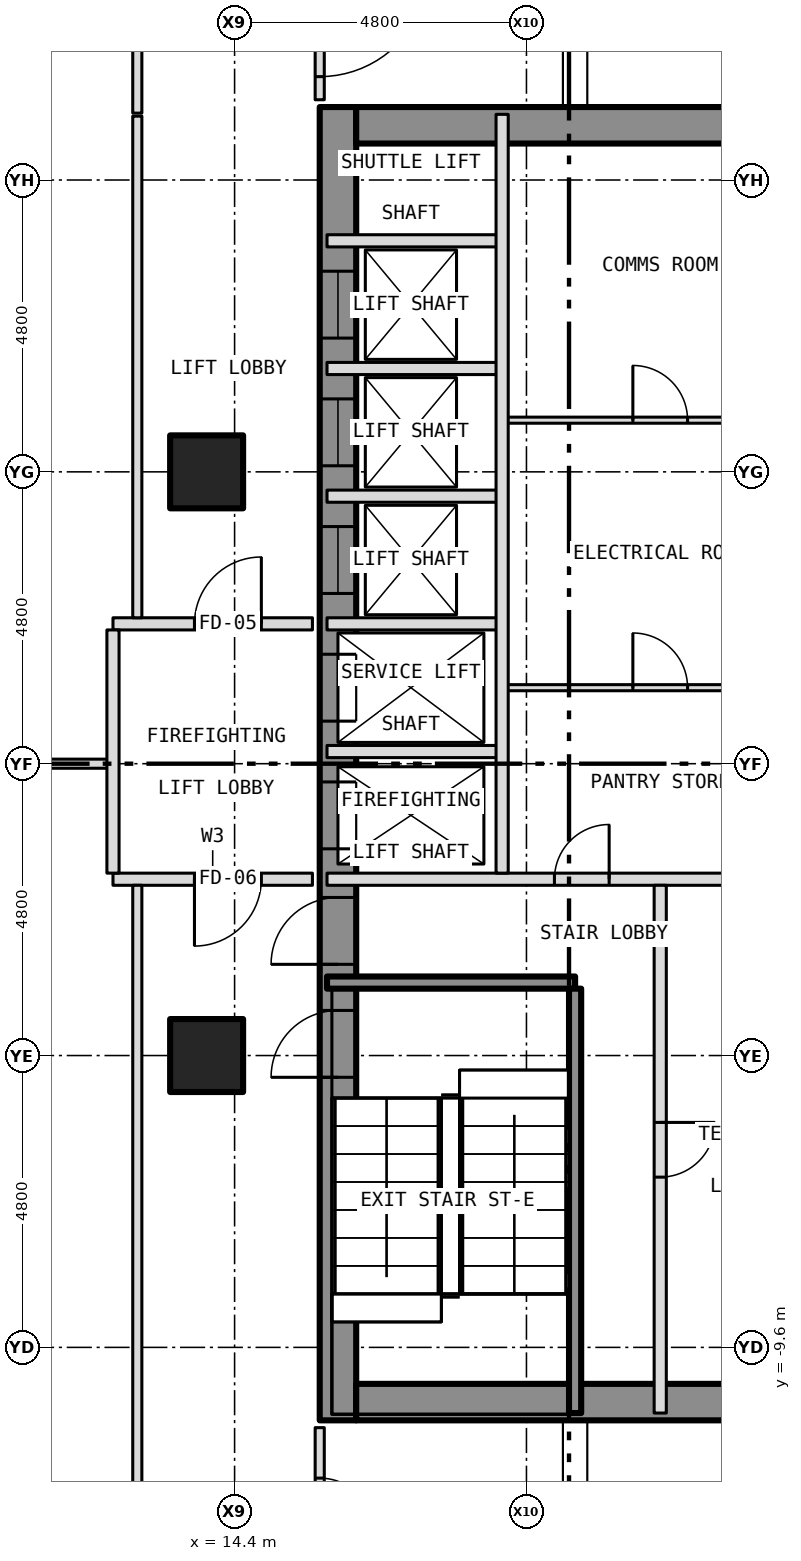
"""IFC4 building model, lengths in metres.
Left out: names, types, materials, properties, quantities, classifications, styles, units other than length and angle.
Written with IfcOpenShell. Run it as: python <this file> out.ifc"""

import sys

from ifc_helpers import new_model, si_unit, direction, frame, frame_2d, origin, origin_2d, place, context, subcontext, project, spatial, rectangle, hollow_rectangle, extrude, element, fill, save


model = new_model("IFC4")
c1 = context("Model", 3, precision=1e-05, world=origin(), true_north=direction((0.0, 1.0)))
c2 = subcontext(c1, "Body", "Model", "MODEL_VIEW")
j1 = project(units=[si_unit("LENGTHUNIT", "METRE"), si_unit("PLANEANGLEUNIT", "RADIAN")], contexts=[c1])
p1 = place(None, origin())
s1 = spatial("IfcSite", under=j1, at=p1, CompositionType="ELEMENT")
p2 = place(p1, origin())
s2 = spatial("IfcBuilding", under=s1, at=p2, CompositionType="ELEMENT")
p3 = place(p2, frame((0.0, 0.0, 33.5)))
s3 = spatial("IfcBuildingStorey", under=s2, at=p3, CompositionType="ELEMENT", Elevation=33.5)
for number, where, z_axis, x_axis in (
    (1, (13.94, -4.8, -0.3), (0.0, 0.0, 1.0), (1.0, 0.0, 0.0)),
    (2, (13.94, 4.8, -0.3), (0.0, 0.0, 1.0), (1.0, 0.0, 0.0)),
):
    element("IfcColumn", number, at=place(p3, frame(where, z_axis=z_axis, x_axis=x_axis)), inside=s3, PredefinedType="COLUMN", context=c2, shape_type="SweptSolid", body=[
        extrude(hollow_rectangle(XDim=1.2, YDim=1.2, WallThickness=0.07, at=origin_2d()), origin(), (0.0, 0.0, 1.0), 5.65),
    ])
p4 = place(p3, frame((16.1, -10.8, 0.0), z_axis=(0.0, 0.0, 1.0), x_axis=(0.0, 1.0, 0.0)))
e3 = element("IfcWall", 3, at=p4, inside=s3, PredefinedType="SHEAR", context=c2, shape_type="SweptSolid", body=[
    extrude(rectangle(XDim=21.6, YDim=0.6, at=frame_2d((10.8, 0.0))), origin(), (0.0, 0.0, 1.0), 4.9),
])
p5 = place(p4, frame((9.4, 0.0, 0.0)))
e4 = element("IfcOpeningElement", 4, at=p5, cuts=e3, PredefinedType="OPENING", context=c2, shape_type="SweptSolid", body=[
    extrude(rectangle(XDim=1.1, YDim=2.1, at=frame_2d((0.55, 1.05))), frame((0.0, 0.312, 0.0), z_axis=(0.0, -1.0, 0.0), x_axis=(1.0, 0.0, 0.0)), (0.0, 0.0, 1.0), 0.624),
])
p6 = place(p4, frame((11.5, 0.0, 0.0)))
e5 = element("IfcOpeningElement", 5, at=p6, cuts=e3, PredefinedType="OPENING", context=c2, shape_type="SweptSolid", body=[
    extrude(rectangle(XDim=1.1, YDim=2.1, at=frame_2d((0.55, 1.05))), frame((0.0, 0.312, 0.0), z_axis=(0.0, -1.0, 0.0), x_axis=(1.0, 0.0, 0.0)), (0.0, 0.0, 1.0), 0.624),
])
p7 = place(p4, frame((13.6, 0.0, 0.0)))
e6 = element("IfcOpeningElement", 6, at=p7, cuts=e3, PredefinedType="OPENING", context=c2, shape_type="SweptSolid", body=[
    extrude(rectangle(XDim=1.1, YDim=2.1, at=frame_2d((0.55, 1.05))), frame((0.0, 0.312, 0.0), z_axis=(0.0, -1.0, 0.0), x_axis=(1.0, 0.0, 0.0)), (0.0, 0.0, 1.0), 0.624),
])
p8 = place(p4, frame((15.7, 0.0, 0.0)))
e7 = element("IfcOpeningElement", 7, at=p8, cuts=e3, PredefinedType="OPENING", context=c2, shape_type="SweptSolid", body=[
    extrude(rectangle(XDim=1.1, YDim=2.1, at=frame_2d((0.55, 1.05))), frame((0.0, 0.312, 0.0), z_axis=(0.0, -1.0, 0.0), x_axis=(1.0, 0.0, 0.0)), (0.0, 0.0, 1.0), 0.624),
])
p9 = place(p4, frame((17.8, 0.0, 0.0)))
e8 = element("IfcOpeningElement", 8, at=p9, cuts=e3, PredefinedType="OPENING", context=c2, shape_type="SweptSolid", body=[
    extrude(rectangle(XDim=1.1, YDim=2.1, at=frame_2d((0.55, 1.05))), frame((0.0, 0.312, 0.0), z_axis=(0.0, -1.0, 0.0), x_axis=(1.0, 0.0, 0.0)), (0.0, 0.0, 1.0), 0.624),
])
p10 = place(p4, frame((5.642, 0.0, 0.0)))
e9 = element("IfcOpeningElement", 9, at=p10, cuts=e3, PredefinedType="OPENING", context=c2, shape_type="SweptSolid", body=[
    extrude(rectangle(XDim=1.1, YDim=2.1, at=frame_2d((0.55, 1.05))), frame((0.0, 0.312, 0.0), z_axis=(0.0, -1.0, 0.0), x_axis=(1.0, 0.0, 0.0)), (0.0, 0.0, 1.0), 0.624),
])
p11 = place(p4, frame((7.5, 0.0, 0.0)))
e10 = element("IfcOpeningElement", 10, at=p11, cuts=e3, PredefinedType="OPENING", context=c2, shape_type="SweptSolid", body=[
    extrude(rectangle(XDim=1.1, YDim=2.1, at=frame_2d((0.55, 1.05))), frame((0.0, 0.312, 0.0), z_axis=(0.0, -1.0, 0.0), x_axis=(1.0, 0.0, 0.0)), (0.0, 0.0, 1.0), 0.624),
])
for number, where, z_axis, x_axis in (
    (11, (16.4, 10.5, 0.0), (0.0, 0.0, 1.0), (1.0, 0.0, 0.0)),
    (12, (16.4, -10.5, 0.0), (0.0, 0.0, 1.0), (1.0, 0.0, 0.0)),
):
    element("IfcWall", number, at=place(p3, frame(where, z_axis=z_axis, x_axis=x_axis)), inside=s3, PredefinedType="SHEAR", context=c2, shape_type="SweptSolid", body=[
        extrude(rectangle(XDim=7.0, YDim=0.6, at=frame_2d((3.5, 0.0))), origin(), (0.0, 0.0, 1.0), 4.9),
    ])
p12 = place(p3, frame((15.92, -3.6, 0.0), z_axis=(0.0, 0.0, 1.0), x_axis=(1.0, 0.0, 0.0)))
e13 = element("IfcWall", 13, at=p12, inside=s3, PredefinedType="SHEAR", context=c2, shape_type="SweptSolid", body=[
    extrude(rectangle(XDim=4.08, YDim=0.2, at=frame_2d((2.04, 0.0))), origin(), (0.0, 0.0, 1.0), 4.9),
])
p13 = place(p3, frame((12.4, -1.9, 0.0), z_axis=(0.0, 0.0, 1.0), x_axis=(1.0, 0.0, 0.0)))
e14 = element("IfcWall", 14, at=p13, inside=s3, PredefinedType="PARTITIONING", context=c2, shape_type="SweptSolid", body=[
    extrude(rectangle(XDim=3.28, YDim=0.2, at=frame_2d((1.64, 0.0))), origin(), (0.0, 0.0, 1.0), 5.35),
])
p14 = place(p13, frame((1.34, 0.0, 0.0)))
e15 = element("IfcOpeningElement", 15, at=p14, cuts=e14, PredefinedType="OPENING", context=c2, shape_type="SweptSolid", body=[
    extrude(rectangle(XDim=1.1, YDim=2.1, at=frame_2d((0.55, 1.05))), frame((0.0, 0.112, 0.0), z_axis=(0.0, -1.0, 0.0), x_axis=(1.0, 0.0, 0.0)), (0.0, 0.0, 1.0), 0.224),
])
p15 = place(p3, frame((15.92, -1.9, 0.0), z_axis=(0.0, 0.0, 1.0), x_axis=(1.0, 0.0, 0.0)))
e16 = element("IfcWall", 16, at=p15, inside=s3, PredefinedType="PARTITIONING", context=c2, shape_type="SweptSolid", body=[
    extrude(rectangle(XDim=7.96, YDim=0.2, at=frame_2d((3.98, 0.0))), origin(), (0.0, 0.0, 1.0), 4.9),
])
p16 = place(p15, frame((3.74, 0.0, 0.0)))
e17 = element("IfcOpeningElement", 17, at=p16, cuts=e16, PredefinedType="OPENING", context=c2, shape_type="SweptSolid", body=[
    extrude(rectangle(XDim=0.9, YDim=2.1, at=frame_2d((0.45, 1.05))), frame((0.0, 0.112, 0.0), z_axis=(0.0, -1.0, 0.0), x_axis=(1.0, 0.0, 0.0)), (0.0, 0.0, 1.0), 0.224),
])
p17 = place(p3, frame((4.954, 0.0, 0.0), z_axis=(0.0, 0.0, 1.0), x_axis=(1.0, 0.0, 0.0)))
e18 = element("IfcWall", 18, at=p17, inside=s3, PredefinedType="PARTITIONING", context=c2, shape_type="SweptSolid", body=[
    extrude(rectangle(XDim=7.446, YDim=0.15, at=frame_2d((3.723, 0.0))), origin(), (0.0, 0.0, 1.0), 4.359),
])
p18 = place(p3, frame((15.92, 0.2, 0.0), z_axis=(0.0, 0.0, 1.0), x_axis=(1.0, 0.0, 0.0)))
e19 = element("IfcWall", 19, at=p18, inside=s3, PredefinedType="PARTITIONING", context=c2, shape_type="SweptSolid", body=[
    extrude(rectangle(XDim=2.88, YDim=0.2, at=frame_2d((1.44, 0.0))), origin(), (0.0, 0.0, 1.0), 4.9),
])
p19 = place(p3, frame((18.8, 1.25, 0.0), z_axis=(0.0, 0.0, 1.0), x_axis=(1.0, 0.0, 0.0)))
e20 = element("IfcWall", 20, at=p19, inside=s3, PredefinedType="PARTITIONING", context=c2, shape_type="SweptSolid", body=[
    extrude(rectangle(XDim=5.08, YDim=0.1, at=frame_2d((2.54, 0.0))), origin(), (0.0, 0.0, 1.0), 4.9),
])
p20 = place(p19, frame((2.15, 0.0, 0.0)))
e21 = element("IfcOpeningElement", 21, at=p20, cuts=e20, PredefinedType="OPENING", context=c2, shape_type="SweptSolid", body=[
    extrude(rectangle(XDim=0.9, YDim=2.1, at=frame_2d((0.45, 1.05))), frame((0.0, 0.062, 0.0), z_axis=(0.0, -1.0, 0.0), x_axis=(1.0, 0.0, 0.0)), (0.0, 0.0, 1.0), 0.124),
])
p21 = place(p3, frame((12.4, 2.3, 0.0), z_axis=(0.0, 0.0, 1.0), x_axis=(1.0, 0.0, 0.0)))
e22 = element("IfcWall", 22, at=p21, inside=s3, PredefinedType="PARTITIONING", context=c2, shape_type="SweptSolid", body=[
    extrude(rectangle(XDim=3.28, YDim=0.2, at=frame_2d((1.64, 0.0))), origin(), (0.0, 0.0, 1.0), 5.35),
])
p22 = place(p21, frame((1.34, 0.0, 0.0)))
e23 = element("IfcOpeningElement", 23, at=p22, cuts=e22, PredefinedType="OPENING", context=c2, shape_type="SweptSolid", body=[
    extrude(rectangle(XDim=1.1, YDim=2.1, at=frame_2d((0.55, 1.05))), frame((0.0, 0.112, 0.0), z_axis=(0.0, -1.0, 0.0), x_axis=(1.0, 0.0, 0.0)), (0.0, 0.0, 1.0), 0.224),
])
for number, where, z_axis, x_axis in (
    (24, (15.92, 2.3, 0.0), (0.0, 0.0, 1.0), (1.0, 0.0, 0.0)),
    (25, (15.92, 4.4, 0.0), (0.0, 0.0, 1.0), (1.0, 0.0, 0.0)),
):
    element("IfcWall", number, at=place(p3, frame(where, z_axis=z_axis, x_axis=x_axis)), inside=s3, PredefinedType="PARTITIONING", context=c2, shape_type="SweptSolid", body=[
        extrude(rectangle(XDim=2.88, YDim=0.2, at=frame_2d((1.44, 0.0))), origin(), (0.0, 0.0, 1.0), 4.9),
    ])
p23 = place(p3, frame((18.8, 5.65, 0.0), z_axis=(0.0, 0.0, 1.0), x_axis=(1.0, 0.0, 0.0)))
e26 = element("IfcWall", 26, at=p23, inside=s3, PredefinedType="PARTITIONING", context=c2, shape_type="SweptSolid", body=[
    extrude(rectangle(XDim=5.08, YDim=0.1, at=frame_2d((2.54, 0.0))), origin(), (0.0, 0.0, 1.0), 4.9),
])
p24 = place(p23, frame((2.15, 0.0, 0.0)))
e27 = element("IfcOpeningElement", 27, at=p24, cuts=e26, PredefinedType="OPENING", context=c2, shape_type="SweptSolid", body=[
    extrude(rectangle(XDim=0.9, YDim=2.1, at=frame_2d((0.45, 1.05))), frame((0.0, 0.062, 0.0), z_axis=(0.0, -1.0, 0.0), x_axis=(1.0, 0.0, 0.0)), (0.0, 0.0, 1.0), 0.124),
])
for number, where, z_axis, x_axis in (
    (28, (15.92, 6.5, 0.0), (0.0, 0.0, 1.0), (1.0, 0.0, 0.0)),
    (29, (15.92, 8.6, 0.0), (0.0, 0.0, 1.0), (1.0, 0.0, 0.0)),
):
    element("IfcWall", number, at=place(p3, frame(where, z_axis=z_axis, x_axis=x_axis)), inside=s3, PredefinedType="PARTITIONING", context=c2, shape_type="SweptSolid", body=[
        extrude(rectangle(XDim=2.88, YDim=0.2, at=frame_2d((1.44, 0.0))), origin(), (0.0, 0.0, 1.0), 4.9),
    ])
p25 = place(p3, frame((12.4, -1.8, 0.0), z_axis=(0.0, 0.0, 1.0), x_axis=(0.0, 1.0, 0.0)))
e30 = element("IfcWall", 30, at=p25, inside=s3, PredefinedType="PARTITIONING", context=c2, shape_type="SweptSolid", body=[
    extrude(rectangle(XDim=4.0, YDim=0.2, at=frame_2d((2.0, 0.0))), origin(), (0.0, 0.0, 1.0), 5.35),
])
p26 = place(p3, frame((12.8, -13.525, 0.0), z_axis=(0.0, 0.0, 1.0), x_axis=(0.0, 1.0, 0.0)))
e31 = element("IfcWall", 31, at=p26, inside=s3, PredefinedType="PARTITIONING", context=c2, shape_type="SweptSolid", body=[
    extrude(rectangle(XDim=11.525, YDim=0.15, at=frame_2d((5.762, 0.0))), origin(), (0.0, 0.0, 1.0), 5.35),
])
p27 = place(p3, frame((12.8, 2.4, 0.0), z_axis=(0.0, 0.0, 1.0), x_axis=(0.0, 1.0, 0.0)))
e32 = element("IfcWall", 32, at=p27, inside=s3, PredefinedType="PARTITIONING", context=c2, shape_type="SweptSolid", body=[
    extrude(rectangle(XDim=8.25, YDim=0.15, at=frame_2d((4.125, 0.0))), origin(), (0.0, 0.0, 1.0), 5.35),
])
p28 = place(p3, frame((12.8, 10.7, 0.0), z_axis=(0.0, 0.0, 1.0), x_axis=(0.0, 1.0, 0.0)))
e33 = element("IfcWall", 33, at=p28, inside=s3, PredefinedType="PARTITIONING", context=c2, shape_type="SweptSolid", body=[
    extrude(rectangle(XDim=2.825, YDim=0.15, at=frame_2d((1.413, 0.0))), origin(), (0.0, 0.0, 1.0), 5.35),
])
p29 = place(p3, frame((15.8, -15.725, 0.0), z_axis=(0.0, 0.0, 1.0), x_axis=(0.0, 1.0, 0.0)))
e34 = element("IfcWall", 34, at=p29, inside=s3, PredefinedType="PARTITIONING", context=c2, shape_type="SweptSolid", body=[
    extrude(rectangle(XDim=4.805, YDim=0.15, at=frame_2d((2.403, 0.0))), origin(), (0.0, 0.0, 1.0), 5.35),
])
p30 = place(p29, frame((3.075, 0.0, 0.0)))
e35 = element("IfcOpeningElement", 35, at=p30, cuts=e34, PredefinedType="OPENING", context=c2, shape_type="SweptSolid", body=[
    extrude(rectangle(XDim=0.9, YDim=2.1, at=frame_2d((0.45, 1.05))), frame((0.0, 0.087, 0.0), z_axis=(0.0, -1.0, 0.0), x_axis=(1.0, 0.0, 0.0)), (0.0, 0.0, 1.0), 0.174),
])
p31 = place(p3, frame((15.8, 10.92, 0.0), z_axis=(0.0, 0.0, 1.0), x_axis=(0.0, 1.0, 0.0)))
e36 = element("IfcWall", 36, at=p31, inside=s3, PredefinedType="PARTITIONING", context=c2, shape_type="SweptSolid", body=[
    extrude(rectangle(XDim=4.805, YDim=0.15, at=frame_2d((2.403, 0.0))), origin(), (0.0, 0.0, 1.0), 5.35),
])
p32 = place(p31, frame((0.38, 0.0, 0.0)))
e37 = element("IfcOpeningElement", 37, at=p32, cuts=e36, PredefinedType="OPENING", context=c2, shape_type="SweptSolid", body=[
    extrude(rectangle(XDim=1.8, YDim=2.1, at=frame_2d((0.9, 1.05))), frame((0.0, 0.087, 0.0), z_axis=(0.0, -1.0, 0.0), x_axis=(1.0, 0.0, 0.0)), (0.0, 0.0, 1.0), 0.174),
])
p33 = place(p3, frame((18.8, -1.8, 0.0), z_axis=(0.0, 0.0, 1.0), x_axis=(0.0, 1.0, 0.0)))
e38 = element("IfcWall", 38, at=p33, inside=s3, PredefinedType="PARTITIONING", context=c2, shape_type="SweptSolid", body=[
    extrude(rectangle(XDim=12.48, YDim=0.2, at=frame_2d((6.24, 0.0))), origin(), (0.0, 0.0, 1.0), 4.9),
])
p34 = place(p3, frame((20.0, -10.68, 0.0), z_axis=(0.0, 0.0, 1.0), x_axis=(0.0, 1.0, 0.0)))
e39 = element("IfcWall", 39, at=p34, inside=s3, PredefinedType="SHEAR", context=c2, shape_type="SweptSolid", body=[
    extrude(rectangle(XDim=6.98, YDim=0.2, at=frame_2d((3.49, 0.0))), origin(), (0.0, 0.0, 1.0), 4.9),
])
p35 = place(p3, frame((21.4, -10.68, 0.0), z_axis=(0.0, 0.0, 1.0), x_axis=(0.0, 1.0, 0.0)))
e40 = element("IfcWall", 40, at=p35, inside=s3, PredefinedType="PARTITIONING", context=c2, shape_type="SweptSolid", body=[
    extrude(rectangle(XDim=8.68, YDim=0.2, at=frame_2d((4.34, 0.0))), origin(), (0.0, 0.0, 1.0), 4.9),
])
p36 = place(p35, frame((3.88, 0.0, 0.0)))
e41 = element("IfcOpeningElement", 41, at=p36, cuts=e40, PredefinedType="OPENING", context=c2, shape_type="SweptSolid", body=[
    extrude(rectangle(XDim=0.9, YDim=2.1, at=frame_2d((0.45, 1.05))), frame((0.0, 0.112, 0.0), z_axis=(0.0, -1.0, 0.0), x_axis=(1.0, 0.0, 0.0)), (0.0, 0.0, 1.0), 0.224),
])
p37 = place(p5, origin())
e42 = element("IfcDoor", 42, at=p37, inside=s3, OperationType="SLIDING_TO_LEFT", PredefinedType="DOOR", context=c2, shape_type="SweptSolid", body=[
    extrude(rectangle(XDim=1.1, YDim=2.1, at=frame_2d((0.55, 1.05))), frame((0.0, 0.025, 0.0), z_axis=(0.0, -1.0, 0.0), x_axis=(1.0, 0.0, 0.0)), (0.0, 0.0, 1.0), 0.05),
])
fill(e4, e42)
p38 = place(p6, origin())
e43 = element("IfcDoor", 43, at=p38, inside=s3, OperationType="SLIDING_TO_LEFT", PredefinedType="DOOR", context=c2, shape_type="SweptSolid", body=[
    extrude(rectangle(XDim=1.1, YDim=2.1, at=frame_2d((0.55, 1.05))), frame((0.0, 0.025, 0.0), z_axis=(0.0, -1.0, 0.0), x_axis=(1.0, 0.0, 0.0)), (0.0, 0.0, 1.0), 0.05),
])
fill(e5, e43)
p39 = place(p7, origin())
e44 = element("IfcDoor", 44, at=p39, inside=s3, OperationType="SLIDING_TO_LEFT", PredefinedType="DOOR", context=c2, shape_type="SweptSolid", body=[
    extrude(rectangle(XDim=1.1, YDim=2.1, at=frame_2d((0.55, 1.05))), frame((0.0, 0.025, 0.0), z_axis=(0.0, -1.0, 0.0), x_axis=(1.0, 0.0, 0.0)), (0.0, 0.0, 1.0), 0.05),
])
fill(e6, e44)
p40 = place(p8, origin())
e45 = element("IfcDoor", 45, at=p40, inside=s3, OperationType="SLIDING_TO_LEFT", PredefinedType="DOOR", context=c2, shape_type="SweptSolid", body=[
    extrude(rectangle(XDim=1.1, YDim=2.1, at=frame_2d((0.55, 1.05))), frame((0.0, 0.025, 0.0), z_axis=(0.0, -1.0, 0.0), x_axis=(1.0, 0.0, 0.0)), (0.0, 0.0, 1.0), 0.05),
])
fill(e7, e45)
p41 = place(p9, origin())
e46 = element("IfcDoor", 46, at=p41, inside=s3, OperationType="SLIDING_TO_LEFT", PredefinedType="DOOR", context=c2, shape_type="SweptSolid", body=[
    extrude(rectangle(XDim=1.1, YDim=2.1, at=frame_2d((0.55, 1.05))), frame((0.0, 0.025, 0.0), z_axis=(0.0, -1.0, 0.0), x_axis=(1.0, 0.0, 0.0)), (0.0, 0.0, 1.0), 0.05),
])
fill(e8, e46)
p42 = place(p10, origin())
e47 = element("IfcDoor", 47, at=p42, inside=s3, OperationType="SINGLE_SWING_LEFT", PredefinedType="DOOR", context=c2, shape_type="SweptSolid", body=[
    extrude(rectangle(XDim=1.1, YDim=2.1, at=frame_2d((0.55, 1.05))), frame((0.0, 0.025, 0.0), z_axis=(0.0, -1.0, 0.0), x_axis=(1.0, 0.0, 0.0)), (0.0, 0.0, 1.0), 0.05),
])
fill(e9, e47)
p43 = place(p11, origin())
e48 = element("IfcDoor", 48, at=p43, inside=s3, OperationType="SINGLE_SWING_LEFT", PredefinedType="DOOR", context=c2, shape_type="SweptSolid", body=[
    extrude(rectangle(XDim=1.1, YDim=2.1, at=frame_2d((0.55, 1.05))), frame((0.0, 0.025, 0.0), z_axis=(0.0, -1.0, 0.0), x_axis=(1.0, 0.0, 0.0)), (0.0, 0.0, 1.0), 0.05),
])
fill(e10, e48)
p44 = place(p36, origin())
e49 = element("IfcDoor", 49, at=p44, inside=s3, OperationType="SINGLE_SWING_RIGHT", PredefinedType="DOOR", context=c2, shape_type="SweptSolid", body=[
    extrude(rectangle(XDim=0.9, YDim=2.1, at=frame_2d((0.45, 1.05))), frame((0.0, 0.025, 0.0), z_axis=(0.0, -1.0, 0.0), x_axis=(1.0, 0.0, 0.0)), (0.0, 0.0, 1.0), 0.05),
])
fill(e41, e49)
p45 = place(p16, origin())
e50 = element("IfcDoor", 50, at=p45, inside=s3, OperationType="SINGLE_SWING_RIGHT", PredefinedType="DOOR", context=c2, shape_type="SweptSolid", body=[
    extrude(rectangle(XDim=0.9, YDim=2.1, at=frame_2d((0.45, 1.05))), frame((0.0, 0.025, 0.0), z_axis=(0.0, -1.0, 0.0), x_axis=(1.0, 0.0, 0.0)), (0.0, 0.0, 1.0), 0.05),
])
fill(e17, e50)
p46 = place(p20, origin())
e51 = element("IfcDoor", 51, at=p46, inside=s3, OperationType="SINGLE_SWING_LEFT", PredefinedType="DOOR", context=c2, shape_type="SweptSolid", body=[
    extrude(rectangle(XDim=0.9, YDim=2.1, at=frame_2d((0.45, 1.05))), frame((0.0, 0.025, 0.0), z_axis=(0.0, -1.0, 0.0), x_axis=(1.0, 0.0, 0.0)), (0.0, 0.0, 1.0), 0.05),
])
fill(e21, e51)
p47 = place(p24, origin())
e52 = element("IfcDoor", 52, at=p47, inside=s3, OperationType="SINGLE_SWING_LEFT", PredefinedType="DOOR", context=c2, shape_type="SweptSolid", body=[
    extrude(rectangle(XDim=0.9, YDim=2.1, at=frame_2d((0.45, 1.05))), frame((0.0, 0.025, 0.0), z_axis=(0.0, -1.0, 0.0), x_axis=(1.0, 0.0, 0.0)), (0.0, 0.0, 1.0), 0.05),
])
fill(e27, e52)
p48 = place(p22, origin())
e53 = element("IfcDoor", 53, at=p48, inside=s3, OperationType="SINGLE_SWING_RIGHT", PredefinedType="DOOR", context=c2, shape_type="SweptSolid", body=[
    extrude(rectangle(XDim=1.1, YDim=2.1, at=frame_2d((0.55, 1.05))), frame((0.0, 0.025, 0.0), z_axis=(0.0, -1.0, 0.0), x_axis=(1.0, 0.0, 0.0)), (0.0, 0.0, 1.0), 0.05),
])
fill(e23, e53)
p49 = place(p14, origin())
e54 = element("IfcDoor", 54, at=p49, inside=s3, OperationType="SINGLE_SWING_LEFT", PredefinedType="DOOR", context=c2, shape_type="SweptSolid", body=[
    extrude(rectangle(XDim=1.1, YDim=2.1, at=frame_2d((0.55, 1.05))), frame((0.0, 0.025, 0.0), z_axis=(0.0, -1.0, 0.0), x_axis=(1.0, 0.0, 0.0)), (0.0, 0.0, 1.0), 0.05),
])
fill(e15, e54)
p50 = place(p30, origin())
e55 = element("IfcDoor", 55, at=p50, inside=s3, OperationType="SINGLE_SWING_LEFT", PredefinedType="DOOR", context=c2, shape_type="SweptSolid", body=[
    extrude(rectangle(XDim=0.9, YDim=2.1, at=frame_2d((0.45, 1.05))), frame((0.0, 0.025, 0.0), z_axis=(0.0, -1.0, 0.0), x_axis=(1.0, 0.0, 0.0)), (0.0, 0.0, 1.0), 0.05),
])
fill(e35, e55)
p51 = place(p32, origin())
e56 = element("IfcDoor", 56, at=p51, inside=s3, OperationType="DOUBLE_DOOR_SINGLE_SWING", PredefinedType="DOOR", context=c2, shape_type="SweptSolid", body=[
    extrude(rectangle(XDim=1.8, YDim=2.1, at=frame_2d((0.9, 1.05))), frame((0.0, 0.025, 0.0), z_axis=(0.0, -1.0, 0.0), x_axis=(1.0, 0.0, 0.0)), (0.0, 0.0, 1.0), 0.05),
])
fill(e37, e56)
save(model, sys.argv[1])
